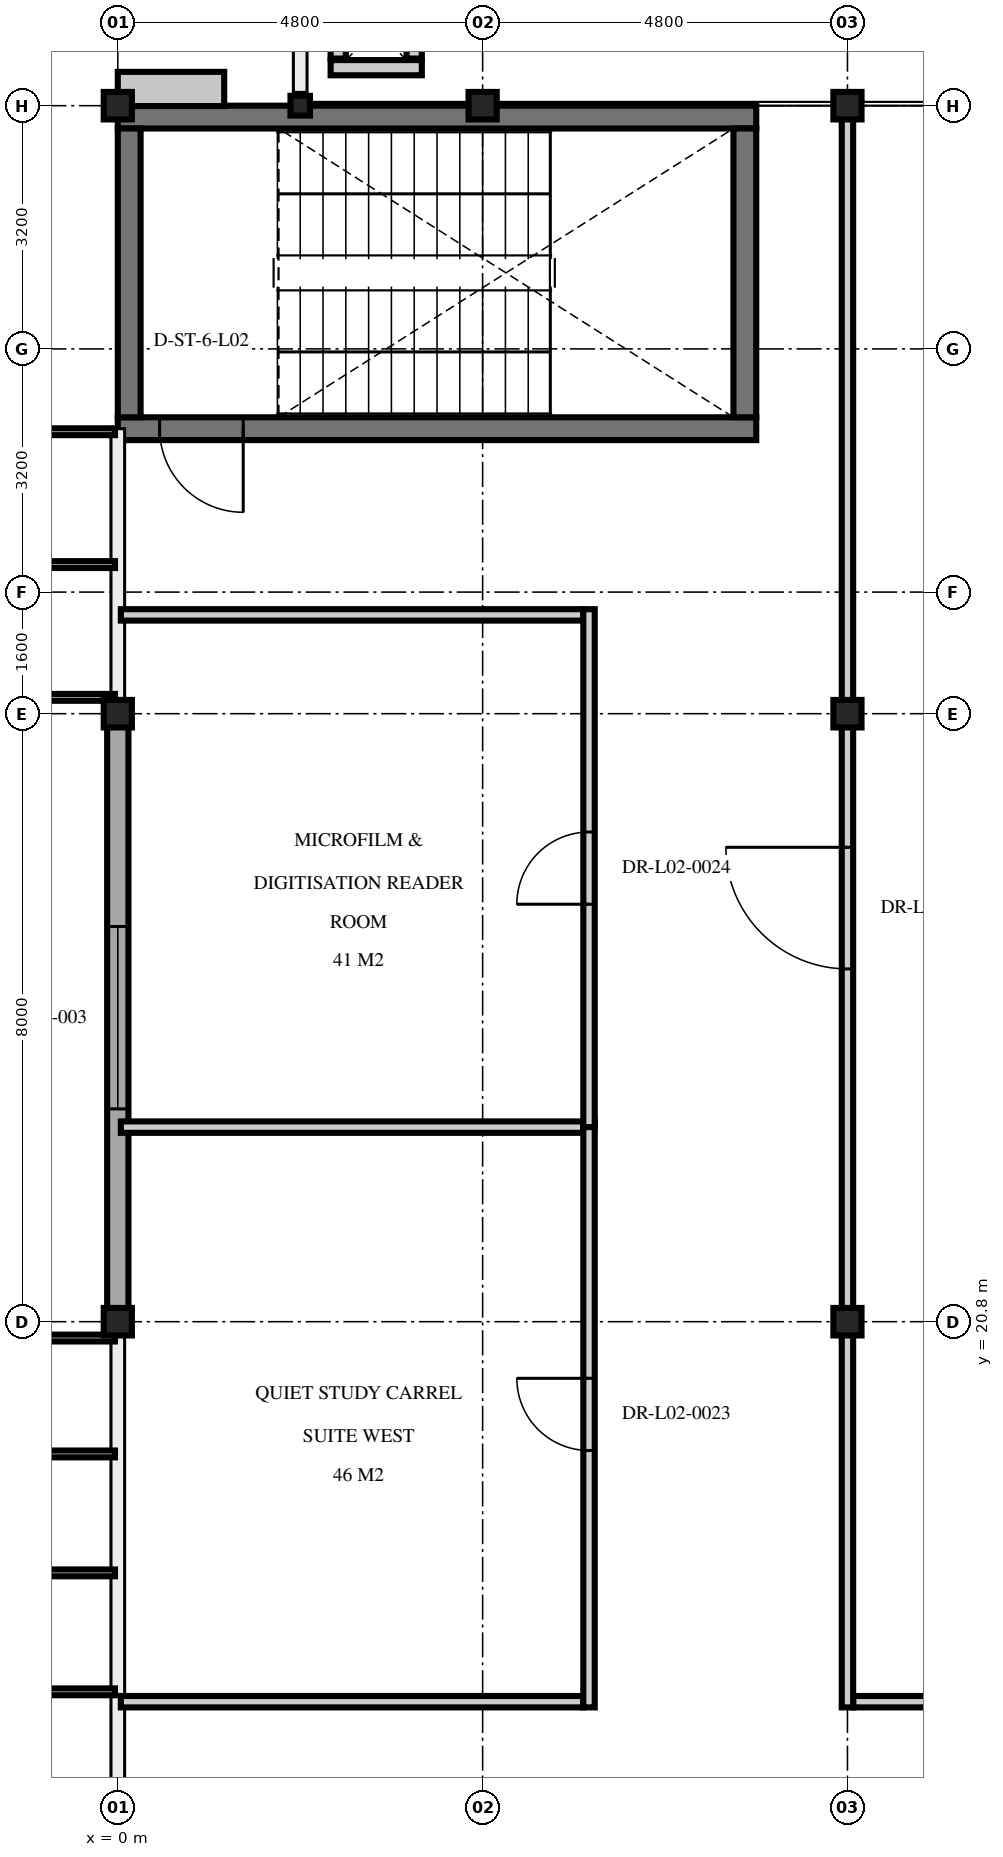
"""IFC4 building model, lengths in metres.
Left out: names, types, materials, properties, quantities, classifications, styles, units other than length and angle.
Written with IfcOpenShell. Run it as: python <this file> out.ifc"""

import sys

from ifc_helpers import new_model, si_unit, direction, frame, frame_2d, origin, origin_2d, place, context, subcontext, project, spatial, rectangle, i_section, extrude, element, fill, save


model = new_model("IFC4")
c1 = context("Model", 3, precision=1e-05, world=origin(), true_north=direction((0.0, 1.0)))
c2 = subcontext(c1, "Body", "Model", "MODEL_VIEW")
j1 = project(units=[si_unit("LENGTHUNIT", "METRE"), si_unit("PLANEANGLEUNIT", "RADIAN")], contexts=[c1])
p1 = place(None, origin())
s1 = spatial("IfcSite", under=j1, at=p1, CompositionType="ELEMENT")
p2 = place(p1, origin())
s2 = spatial("IfcBuilding", under=s1, at=p2, CompositionType="ELEMENT")
p3 = place(p2, frame((0.0, 0.0, 9.6)))
s3 = spatial("IfcBuildingStorey", under=s2, at=p3, CompositionType="ELEMENT", Elevation=9.6)
for number, where, z_axis, x_axis in (
    (1, (0.0, 36.8, 0.0), (0.0, 0.0, 1.0), (1.0, 0.0, 0.0)),
    (2, (4.8, 36.8, 0.0), (0.0, 0.0, 1.0), (1.0, 0.0, 0.0)),
    (3, (9.6, 36.8, 0.0), (0.0, 0.0, 1.0), (1.0, 0.0, 0.0)),
    (4, (0.0, 20.8, 0.0), (0.0, 0.0, 1.0), (1.0, 0.0, 0.0)),
    (5, (0.0, 28.8, 0.0), (0.0, 0.0, 1.0), (1.0, 0.0, 0.0)),
    (6, (9.6, 20.8, 0.0), (0.0, 0.0, 1.0), (1.0, 0.0, 0.0)),
    (7, (9.6, 28.8, 0.0), (0.0, 0.0, 1.0), (1.0, 0.0, 0.0)),
):
    element("IfcColumn", number, at=place(p3, frame(where, z_axis=z_axis, x_axis=x_axis)), inside=s3, PredefinedType="COLUMN", context=c2, shape_type="SweptSolid", body=[
        extrude(i_section(OverallWidth=0.371, OverallDepth=0.362, WebThickness=0.012, FlangeThickness=0.021, at=origin_2d()), origin(), (0.0, 0.0, 1.0), 4.5),
    ])
p4 = place(p3, frame((2.4, 36.8, 0.0), z_axis=(0.0, 0.0, 1.0), x_axis=(1.0, 0.0, 0.0)))
e8 = element("IfcColumn", 8, at=p4, inside=s3, PredefinedType="COLUMN", context=c2, shape_type="SweptSolid", body=[
    extrude(i_section(OverallWidth=0.256, OverallDepth=0.26, WebThickness=0.01, FlangeThickness=0.017, at=origin_2d()), origin(), (0.0, 0.0, 1.0), 4.5),
])
p5 = place(p3, frame((8.4, 32.55, 0.0), z_axis=(0.0, 0.0, 1.0), x_axis=(-1.0, 0.0, 0.0)))
e9 = element("IfcWall", 9, at=p5, inside=s3, PredefinedType="SHEAR", context=c2, shape_type="SweptSolid", body=[
    extrude(rectangle(XDim=8.4, YDim=0.3, at=frame_2d((4.2, 0.0))), origin(), (0.0, 0.0, 1.0), 4.26),
])
p6 = place(p5, frame((6.75, 0.0, 0.0)))
e10 = element("IfcOpeningElement", 10, at=p6, cuts=e9, PredefinedType="OPENING", context=c2, shape_type="SweptSolid", body=[
    extrude(rectangle(XDim=1.1, YDim=2.2, at=frame_2d((0.55, 1.1))), frame((0.0, 0.16, 0.0), z_axis=(0.0, -1.0, 0.0), x_axis=(1.0, 0.0, 0.0)), (0.0, 0.0, 1.0), 0.32),
])
p7 = place(p3, frame((0.0, 36.65, 0.0), z_axis=(0.0, 0.0, 1.0), x_axis=(1.0, 0.0, 0.0)))
e11 = element("IfcWall", 11, at=p7, inside=s3, PredefinedType="SHEAR", context=c2, shape_type="SweptSolid", body=[
    extrude(rectangle(XDim=8.4, YDim=0.3, at=frame_2d((4.2, 0.0))), origin(), (0.0, 0.0, 1.0), 4.26),
])
for number, where, z_axis, x_axis in (
    (12, (0.15, 32.7, 0.0), (0.0, 0.0, 1.0), (0.0, 1.0, 0.0)),
    (13, (8.25, 36.5, 0.0), (0.0, 0.0, 1.0), (0.0, -1.0, 0.0)),
):
    element("IfcWall", number, at=place(p3, frame(where, z_axis=z_axis, x_axis=x_axis)), inside=s3, PredefinedType="SHEAR", context=c2, shape_type="SweptSolid", body=[
        extrude(rectangle(XDim=3.8, YDim=0.3, at=frame_2d((1.9, 0.0))), origin(), (0.0, 0.0, 1.0), 4.26),
    ])
p8 = place(p3, frame((4.0, 37.3, 0.0), z_axis=(0.0, 0.0, 1.0), x_axis=(-1.0, 0.0, 0.0)))
e14 = element("IfcWall", 14, at=p8, inside=s3, PredefinedType="PARTITIONING", context=c2, shape_type="SweptSolid", body=[
    extrude(rectangle(XDim=1.2, YDim=0.2, at=frame_2d((0.6, 0.0))), origin(), (0.0, 0.0, 1.0), 3.76),
])
for number, where, z_axis, x_axis in (
    (15, (2.9, 37.42, 0.0), (0.0, 0.0, 1.0), (0.0, 1.0, 0.0)),
    (16, (3.9, 38.18, 0.0), (0.0, 0.0, 1.0), (0.0, -1.0, 0.0)),
):
    element("IfcWall", number, at=place(p3, frame(where, z_axis=z_axis, x_axis=x_axis)), inside=s3, PredefinedType="PARTITIONING", context=c2, shape_type="SweptSolid", body=[
        extrude(rectangle(XDim=0.76, YDim=0.2, at=frame_2d((0.38, 0.0))), origin(), (0.0, 0.0, 1.0), 3.76),
    ])
p9 = place(p3, frame((0.0, 20.715, 0.0), z_axis=(0.0, 0.0, 1.0), x_axis=(0.0, 1.0, 0.0)))
e17 = element("IfcWall", 17, at=p9, inside=s3, PredefinedType="SOLIDWALL", context=c2, shape_type="SweptSolid", body=[
    extrude(rectangle(XDim=8.17, YDim=0.28, at=frame_2d((4.085, 0.0))), origin(), (0.0, 0.0, 1.0), 3.685),
])
p10 = place(p9, frame((2.885, 0.0, 0.95)))
e18 = element("IfcOpeningElement", 18, at=p10, cuts=e17, PredefinedType="OPENING", context=c2, shape_type="SweptSolid", body=[
    extrude(rectangle(XDim=2.4, YDim=2.1, at=frame_2d((1.2, 1.05))), frame((0.0, 0.15, 0.0), z_axis=(0.0, -1.0, 0.0), x_axis=(1.0, 0.0, 0.0)), (0.0, 0.0, 1.0), 0.3),
])
for number, where, z_axis, x_axis in (
    (19, (0.04, 15.8, 0.0), (0.0, 0.0, 1.0), (1.0, 0.0, 0.0)),
    (20, (0.04, 23.36, 0.0), (0.0, 0.0, 1.0), (1.0, 0.0, 0.0)),
):
    element("IfcWall", number, at=place(p3, frame(where, z_axis=z_axis, x_axis=x_axis)), inside=s3, PredefinedType="PARTITIONING", context=c2, shape_type="SweptSolid", body=[
        extrude(rectangle(XDim=6.085, YDim=0.15, at=frame_2d((3.042, 0.0))), origin(), (0.0, 0.0, 1.0), 3.785),
    ])
p11 = place(p3, frame((6.2, 15.725, 0.0), z_axis=(0.0, 0.0, 1.0), x_axis=(0.0, 1.0, 0.0)))
e21 = element("IfcWall", 21, at=p11, inside=s3, PredefinedType="PARTITIONING", context=c2, shape_type="SweptSolid", body=[
    extrude(rectangle(XDim=7.71, YDim=0.15, at=frame_2d((3.855, 0.0))), origin(), (0.0, 0.0, 1.0), 3.685),
])
p12 = place(p11, frame((3.38, 0.0, 0.0)))
e22 = element("IfcOpeningElement", 22, at=p12, cuts=e21, PredefinedType="OPENING", context=c2, shape_type="SweptSolid", body=[
    extrude(rectangle(XDim=0.95, YDim=2.15, at=frame_2d((0.475, 1.075))), frame((0.0, 0.085, 0.0), z_axis=(0.0, -1.0, 0.0), x_axis=(1.0, 0.0, 0.0)), (0.0, 0.0, 1.0), 0.17),
])
p13 = place(p3, frame((0.04, 30.1, 0.0), z_axis=(0.0, 0.0, 1.0), x_axis=(1.0, 0.0, 0.0)))
e23 = element("IfcWall", 23, at=p13, inside=s3, PredefinedType="PARTITIONING", context=c2, shape_type="SweptSolid", body=[
    extrude(rectangle(XDim=6.085, YDim=0.15, at=frame_2d((3.042, 0.0))), origin(), (0.0, 0.0, 1.0), 3.785),
])
p14 = place(p3, frame((6.2, 23.36, 0.0), z_axis=(0.0, 0.0, 1.0), x_axis=(0.0, 1.0, 0.0)))
e24 = element("IfcWall", 24, at=p14, inside=s3, PredefinedType="PARTITIONING", context=c2, shape_type="SweptSolid", body=[
    extrude(rectangle(XDim=6.815, YDim=0.15, at=frame_2d((3.407, 0.0))), origin(), (0.0, 0.0, 1.0), 3.685),
])
p15 = place(p14, frame((2.933, 0.0, 0.0)))
e25 = element("IfcOpeningElement", 25, at=p15, cuts=e24, PredefinedType="OPENING", context=c2, shape_type="SweptSolid", body=[
    extrude(rectangle(XDim=0.95, YDim=2.15, at=frame_2d((0.475, 1.075))), frame((0.0, 0.085, 0.0), z_axis=(0.0, -1.0, 0.0), x_axis=(1.0, 0.0, 0.0)), (0.0, 0.0, 1.0), 0.17),
])
p16 = place(p3, frame((9.675, 15.8, 0.0), z_axis=(0.0, 0.0, 1.0), x_axis=(1.0, 0.0, 0.0)))
e26 = element("IfcWall", 26, at=p16, inside=s3, PredefinedType="PARTITIONING", context=c2, shape_type="SweptSolid", body=[
    extrude(rectangle(XDim=16.45, YDim=0.15, at=frame_2d((8.225, 0.0))), origin(), (0.0, 0.0, 1.0), 3.785),
])
p17 = place(p3, frame((9.6, 15.725, 0.0), z_axis=(0.0, 0.0, 1.0), x_axis=(0.0, 1.0, 0.0)))
e27 = element("IfcWall", 27, at=p17, inside=s3, PredefinedType="PARTITIONING", context=c2, shape_type="SweptSolid", body=[
    extrude(rectangle(XDim=21.035, YDim=0.15, at=frame_2d((10.518, 0.0))), origin(), (0.0, 0.0, 1.0), 3.685),
])
p18 = place(p17, frame((9.717, 0.0, 0.0)))
e28 = element("IfcOpeningElement", 28, at=p18, cuts=e27, PredefinedType="OPENING", context=c2, shape_type="SweptSolid", body=[
    extrude(rectangle(XDim=1.6, YDim=2.25, at=frame_2d((0.8, 1.125))), frame((0.0, 0.085, 0.0), z_axis=(0.0, -1.0, 0.0), x_axis=(1.0, 0.0, 0.0)), (0.0, 0.0, 1.0), 0.17),
])
p19 = place(p6, origin())
e29 = element("IfcDoor", 29, at=p19, inside=s3, OperationType="SINGLE_SWING_LEFT", PredefinedType="DOOR", context=c2, shape_type="SweptSolid", body=[
    extrude(rectangle(XDim=1.1, YDim=2.2, at=frame_2d((0.55, 1.1))), frame((0.0, 0.025, 0.0), z_axis=(0.0, -1.0, 0.0), x_axis=(1.0, 0.0, 0.0)), (0.0, 0.0, 1.0), 0.05),
])
fill(e10, e29)
p20 = place(p10, origin())
e30 = element("IfcWindow", 30, at=p20, inside=s3, PartitioningType="SINGLE_PANEL", PredefinedType="WINDOW", context=c2, shape_type="SweptSolid", body=[
    extrude(rectangle(XDim=2.4, YDim=2.1, at=frame_2d((1.2, 1.05))), frame((0.0, 0.03, 0.0), z_axis=(0.0, -1.0, 0.0), x_axis=(1.0, 0.0, 0.0)), (0.0, 0.0, 1.0), 0.06),
])
fill(e18, e30)
p21 = place(p12, origin())
e31 = element("IfcDoor", 31, at=p21, inside=s3, OperationType="SINGLE_SWING_RIGHT", PredefinedType="DOOR", context=c2, shape_type="SweptSolid", body=[
    extrude(rectangle(XDim=0.95, YDim=2.15, at=frame_2d((0.475, 1.075))), frame((0.0, 0.025, 0.0), z_axis=(0.0, -1.0, 0.0), x_axis=(1.0, 0.0, 0.0)), (0.0, 0.0, 1.0), 0.05),
])
fill(e22, e31)
p22 = place(p15, origin())
e32 = element("IfcDoor", 32, at=p22, inside=s3, OperationType="SINGLE_SWING_LEFT", PredefinedType="DOOR", context=c2, shape_type="SweptSolid", body=[
    extrude(rectangle(XDim=0.95, YDim=2.15, at=frame_2d((0.475, 1.075))), frame((0.0, 0.025, 0.0), z_axis=(0.0, -1.0, 0.0), x_axis=(1.0, 0.0, 0.0)), (0.0, 0.0, 1.0), 0.05),
])
fill(e25, e32)
p23 = place(p18, origin())
e33 = element("IfcDoor", 33, at=p23, inside=s3, OperationType="DOUBLE_DOOR_SINGLE_SWING", PredefinedType="DOOR", context=c2, shape_type="SweptSolid", body=[
    extrude(rectangle(XDim=1.6, YDim=2.25, at=frame_2d((0.8, 1.125))), frame((0.0, 0.025, 0.0), z_axis=(0.0, -1.0, 0.0), x_axis=(1.0, 0.0, 0.0)), (0.0, 0.0, 1.0), 0.05),
])
fill(e28, e33)
save(model, sys.argv[1])
